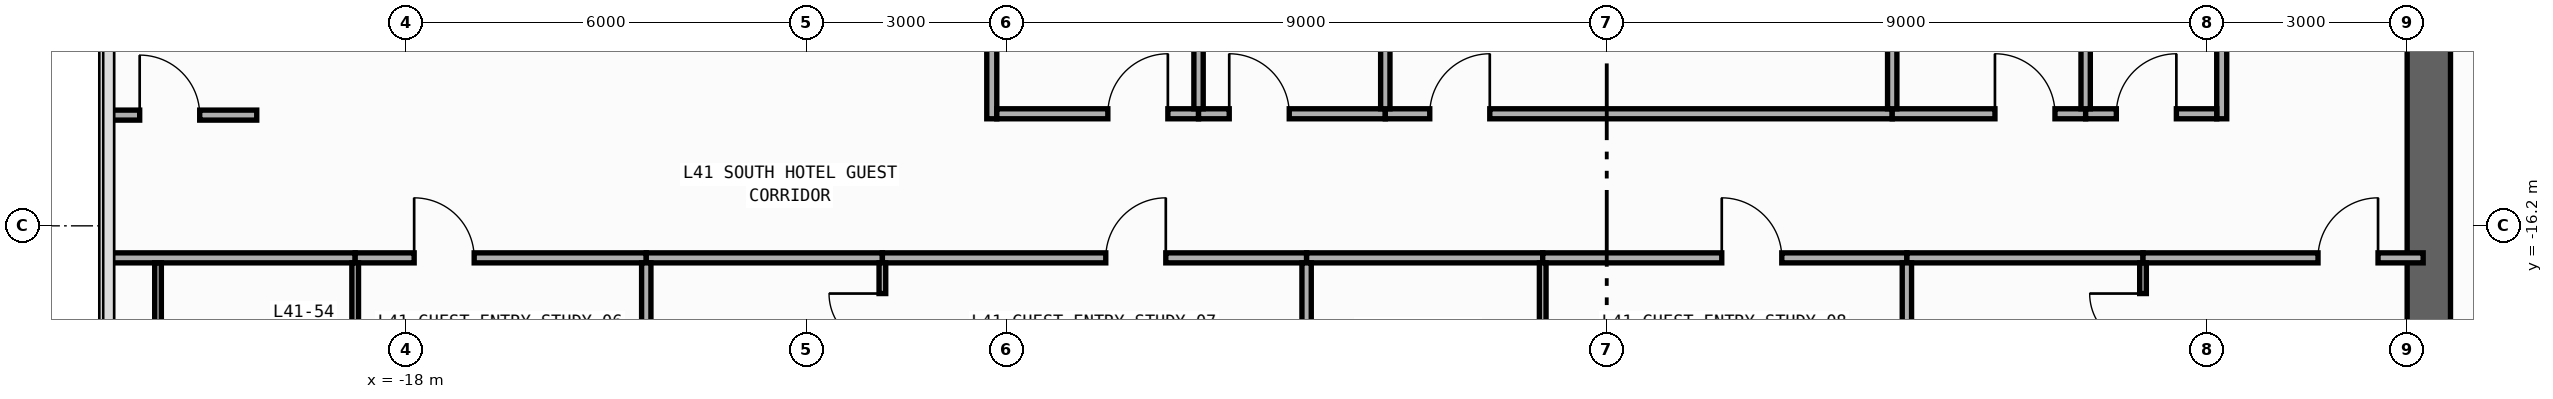
"""IFC4 building model, lengths in metres.
Left out: names, types, materials, properties, quantities, classifications, styles, units other than length and angle.
Written with IfcOpenShell. Run it as: python <this file> out.ifc"""

import sys

from ifc_helpers import new_model, si_unit, direction, frame, frame_2d, origin, place, context, subcontext, project, spatial, rectangle, extrude, element, fill, save


model = new_model("IFC4")
c1 = context("Model", 3, precision=1e-05, world=origin(), true_north=direction((0.0, 1.0)))
c2 = subcontext(c1, "Body", "Model", "MODEL_VIEW")
j1 = project(units=[si_unit("LENGTHUNIT", "METRE"), si_unit("PLANEANGLEUNIT", "RADIAN")], contexts=[c1])
p1 = place(None, origin())
s1 = spatial("IfcSite", under=j1, at=p1, CompositionType="ELEMENT")
p2 = place(p1, origin())
s2 = spatial("IfcBuilding", under=s1, at=p2, CompositionType="ELEMENT")
p3 = place(p2, frame((0.0, 0.0, 180.2)))
s3 = spatial("IfcBuildingStorey", under=s2, at=p3, CompositionType="ELEMENT", Elevation=180.2)
p4 = place(p3, frame((12.325, -19.8, 0.0), z_axis=(0.0, 0.0, 1.0), x_axis=(0.0, 1.0, 0.0)))
e1 = element("IfcWall", 1, at=p4, inside=s3, PredefinedType="SHEAR", context=c2, shape_type="SweptSolid", body=[
    extrude(rectangle(XDim=27.0, YDim=0.65, at=frame_2d((13.5, 0.0))), origin(), (0.0, 0.0, 1.0), 3.54),
])
p5 = place(p4, frame((23.05, 0.0, 0.0)))
e2 = element("IfcOpeningElement", 2, at=p5, cuts=e1, PredefinedType="OPENING", context=c2, shape_type="SweptSolid", body=[
    extrude(rectangle(XDim=1.1, YDim=2.2, at=frame_2d((0.55, 1.1))), frame((0.0, 0.335, 0.0), z_axis=(0.0, -1.0, 0.0), x_axis=(1.0, 0.0, 0.0)), (0.0, 0.0, 1.0), 0.67),
])
p6 = place(p4, frame((19.85, 0.0, 0.0)))
e3 = element("IfcOpeningElement", 3, at=p6, cuts=e1, PredefinedType="OPENING", context=c2, shape_type="SweptSolid", body=[
    extrude(rectangle(XDim=1.1, YDim=2.2, at=frame_2d((0.55, 1.1))), frame((0.0, 0.335, 0.0), z_axis=(0.0, -1.0, 0.0), x_axis=(1.0, 0.0, 0.0)), (0.0, 0.0, 1.0), 0.67),
])
p7 = place(p4, frame((16.65, 0.0, 0.0)))
e4 = element("IfcOpeningElement", 4, at=p7, cuts=e1, PredefinedType="OPENING", context=c2, shape_type="SweptSolid", body=[
    extrude(rectangle(XDim=1.1, YDim=2.2, at=frame_2d((0.55, 1.1))), frame((0.0, 0.335, 0.0), z_axis=(0.0, -1.0, 0.0), x_axis=(1.0, 0.0, 0.0)), (0.0, 0.0, 1.0), 0.67),
])
p8 = place(p4, frame((10.175, 0.0, 0.0)))
e5 = element("IfcOpeningElement", 5, at=p8, cuts=e1, PredefinedType="OPENING", context=c2, shape_type="SweptSolid", body=[
    extrude(rectangle(XDim=0.85, YDim=2.1, at=frame_2d((0.425, 1.05))), frame((0.0, 0.335, 0.0), z_axis=(0.0, -1.0, 0.0), x_axis=(1.0, 0.0, 0.0)), (0.0, 0.0, 1.0), 0.67),
])
p9 = place(p4, frame((12.725, 0.0, 0.0)))
e6 = element("IfcOpeningElement", 6, at=p9, cuts=e1, PredefinedType="OPENING", context=c2, shape_type="SweptSolid", body=[
    extrude(rectangle(XDim=1.15, YDim=2.2, at=frame_2d((0.575, 1.1))), frame((0.0, 0.335, 0.0), z_axis=(0.0, -1.0, 0.0), x_axis=(1.0, 0.0, 0.0)), (0.0, 0.0, 1.0), 0.67),
])
p10 = place(p4, frame((25.125, 0.0, 0.0)))
e7 = element("IfcOpeningElement", 7, at=p10, cuts=e1, PredefinedType="OPENING", context=c2, shape_type="SweptSolid", body=[
    extrude(rectangle(XDim=0.85, YDim=2.1, at=frame_2d((0.425, 1.05))), frame((0.0, 0.335, 0.0), z_axis=(0.0, -1.0, 0.0), x_axis=(1.0, 0.0, 0.0)), (0.0, 0.0, 1.0), 0.67),
])
p11 = place(p3, frame((-9.22, -14.595, 0.0), z_axis=(0.0, 0.0, 1.0), x_axis=(0.0, 1.0, 0.0)))
e8 = element("IfcWall", 8, at=p11, inside=s3, PredefinedType="PARTITIONING", context=c2, shape_type="SweptSolid", body=[
    extrude(rectangle(XDim=15.095, YDim=0.15, at=frame_2d((7.547, 0.0))), origin(), (0.0, 0.0, 1.0), 2.952),
])
p12 = place(p11, frame((8.707, 0.0, 0.0)))
e9 = element("IfcOpeningElement", 9, at=p12, cuts=e8, PredefinedType="OPENING", context=c2, shape_type="SweptSolid", body=[
    extrude(rectangle(XDim=0.9, YDim=2.15, at=frame_2d((0.45, 1.075))), frame((0.0, 0.085, 0.0), z_axis=(0.0, -1.0, 0.0), x_axis=(1.0, 0.0, 0.0)), (0.0, 0.0, 1.0), 0.17),
])
p13 = place(p3, frame((9.22, -14.595, 0.0), z_axis=(0.0, 0.0, 1.0), x_axis=(0.0, 1.0, 0.0)))
e10 = element("IfcWall", 10, at=p13, inside=s3, PredefinedType="PARTITIONING", context=c2, shape_type="SweptSolid", body=[
    extrude(rectangle(XDim=15.095, YDim=0.15, at=frame_2d((7.547, 0.0))), origin(), (0.0, 0.0, 1.0), 2.952),
])
p14 = place(p13, frame((8.707, 0.0, 0.0)))
e11 = element("IfcOpeningElement", 11, at=p14, cuts=e10, PredefinedType="OPENING", context=c2, shape_type="SweptSolid", body=[
    extrude(rectangle(XDim=0.9, YDim=2.15, at=frame_2d((0.45, 1.075))), frame((0.0, 0.085, 0.0), z_axis=(0.0, -1.0, 0.0), x_axis=(1.0, 0.0, 0.0)), (0.0, 0.0, 1.0), 0.17),
])
p15 = place(p3, frame((-9.145, -14.52, 0.0), z_axis=(0.0, 0.0, 1.0), x_axis=(1.0, 0.0, 0.0)))
e12 = element("IfcWall", 12, at=p15, inside=s3, PredefinedType="PARTITIONING", context=c2, shape_type="SweptSolid", body=[
    extrude(rectangle(XDim=3.025, YDim=0.15, at=frame_2d((1.512, 0.0))), origin(), (0.0, 0.0, 1.0), 3.54),
])
p16 = place(p15, frame((1.665, 0.0, 0.0)))
e13 = element("IfcOpeningElement", 13, at=p16, cuts=e12, PredefinedType="OPENING", context=c2, shape_type="SweptSolid", body=[
    extrude(rectangle(XDim=0.9, YDim=2.15, at=frame_2d((0.45, 1.075))), frame((0.0, 0.085, 0.0), z_axis=(0.0, -1.0, 0.0), x_axis=(1.0, 0.0, 0.0)), (0.0, 0.0, 1.0), 0.17),
])
p17 = place(p3, frame((-6.12, -14.52, 0.0), z_axis=(0.0, 0.0, 1.0), x_axis=(1.0, 0.0, 0.0)))
e14 = element("IfcWall", 14, at=p17, inside=s3, PredefinedType="PARTITIONING", context=c2, shape_type="SweptSolid", body=[
    extrude(rectangle(XDim=2.8, YDim=0.15, at=frame_2d((1.4, 0.0))), origin(), (0.0, 0.0, 1.0), 3.54),
])
p18 = place(p17, frame((0.46, 0.0, 0.0)))
e15 = element("IfcOpeningElement", 15, at=p18, cuts=e14, PredefinedType="OPENING", context=c2, shape_type="SweptSolid", body=[
    extrude(rectangle(XDim=0.9, YDim=2.15, at=frame_2d((0.45, 1.075))), frame((0.0, 0.085, 0.0), z_axis=(0.0, -1.0, 0.0), x_axis=(1.0, 0.0, 0.0)), (0.0, 0.0, 1.0), 0.17),
])
p19 = place(p3, frame((-3.32, -14.52, 0.0), z_axis=(0.0, 0.0, 1.0), x_axis=(1.0, 0.0, 0.0)))
e16 = element("IfcWall", 16, at=p19, inside=s3, PredefinedType="PARTITIONING", context=c2, shape_type="SweptSolid", body=[
    extrude(rectangle(XDim=7.6, YDim=0.15, at=frame_2d((3.8, 0.0))), origin(), (0.0, 0.0, 1.0), 3.54),
])
p20 = place(p19, frame((0.667, 0.0, 0.0)))
e17 = element("IfcOpeningElement", 17, at=p20, cuts=e16, PredefinedType="OPENING", context=c2, shape_type="SweptSolid", body=[
    extrude(rectangle(XDim=0.9, YDim=2.15, at=frame_2d((0.45, 1.075))), frame((0.0, 0.085, 0.0), z_axis=(0.0, -1.0, 0.0), x_axis=(1.0, 0.0, 0.0)), (0.0, 0.0, 1.0), 0.17),
])
p21 = place(p3, frame((4.28, -14.52, 0.0), z_axis=(0.0, 0.0, 1.0), x_axis=(1.0, 0.0, 0.0)))
e18 = element("IfcWall", 18, at=p21, inside=s3, PredefinedType="PARTITIONING", context=c2, shape_type="SweptSolid", body=[
    extrude(rectangle(XDim=2.9, YDim=0.15, at=frame_2d((1.45, 0.0))), origin(), (0.0, 0.0, 1.0), 3.54),
])
p22 = place(p21, frame((1.54, 0.0, 0.0)))
e19 = element("IfcOpeningElement", 19, at=p22, cuts=e18, PredefinedType="OPENING", context=c2, shape_type="SweptSolid", body=[
    extrude(rectangle(XDim=0.9, YDim=2.15, at=frame_2d((0.45, 1.075))), frame((0.0, 0.085, 0.0), z_axis=(0.0, -1.0, 0.0), x_axis=(1.0, 0.0, 0.0)), (0.0, 0.0, 1.0), 0.17),
])
p23 = place(p3, frame((7.18, -14.52, 0.0), z_axis=(0.0, 0.0, 1.0), x_axis=(1.0, 0.0, 0.0)))
e20 = element("IfcWall", 20, at=p23, inside=s3, PredefinedType="PARTITIONING", context=c2, shape_type="SweptSolid", body=[
    extrude(rectangle(XDim=1.965, YDim=0.15, at=frame_2d((0.982, 0.0))), origin(), (0.0, 0.0, 1.0), 3.54),
])
p24 = place(p23, frame((0.46, 0.0, 0.0)))
e21 = element("IfcOpeningElement", 21, at=p24, cuts=e20, PredefinedType="OPENING", context=c2, shape_type="SweptSolid", body=[
    extrude(rectangle(XDim=0.9, YDim=2.15, at=frame_2d((0.45, 1.075))), frame((0.0, 0.085, 0.0), z_axis=(0.0, -1.0, 0.0), x_axis=(1.0, 0.0, 0.0)), (0.0, 0.0, 1.0), 0.17),
])
p25 = place(p3, frame((-22.455, -16.68, 0.0), z_axis=(0.0, 0.0, 1.0), x_axis=(1.0, 0.0, 0.0)))
e22 = element("IfcWall", 22, at=p25, inside=s3, PredefinedType="PARTITIONING", context=c2, shape_type="SweptSolid", body=[
    extrude(rectangle(XDim=3.691, YDim=0.15, at=frame_2d((1.846, 0.0))), origin(), (0.0, 0.0, 1.0), 3.54),
])
p26 = place(p3, frame((-18.764, -16.68, 0.0), z_axis=(0.0, 0.0, 1.0), x_axis=(1.0, 0.0, 0.0)))
e23 = element("IfcWall", 23, at=p26, inside=s3, PredefinedType="PARTITIONING", context=c2, shape_type="SweptSolid", body=[
    extrude(rectangle(XDim=4.364, YDim=0.15, at=frame_2d((2.182, 0.0))), origin(), (0.0, 0.0, 1.0), 3.54),
])
p27 = place(p26, frame((0.884, 0.0, 0.0)))
e24 = element("IfcOpeningElement", 24, at=p27, cuts=e23, PredefinedType="OPENING", context=c2, shape_type="SweptSolid", body=[
    extrude(rectangle(XDim=0.9, YDim=2.15, at=frame_2d((0.45, 1.075))), frame((0.0, 0.085, 0.0), z_axis=(0.0, -1.0, 0.0), x_axis=(1.0, 0.0, 0.0)), (0.0, 0.0, 1.0), 0.17),
])
p28 = place(p3, frame((-14.4, -16.68, 0.0), z_axis=(0.0, 0.0, 1.0), x_axis=(1.0, 0.0, 0.0)))
e25 = element("IfcWall", 25, at=p28, inside=s3, PredefinedType="PARTITIONING", context=c2, shape_type="SweptSolid", body=[
    extrude(rectangle(XDim=3.54, YDim=0.15, at=frame_2d((1.77, 0.0))), origin(), (0.0, 0.0, 1.0), 3.54),
])
p29 = place(p3, frame((-10.86, -16.68, 0.0), z_axis=(0.0, 0.0, 1.0), x_axis=(1.0, 0.0, 0.0)))
e26 = element("IfcWall", 26, at=p29, inside=s3, PredefinedType="PARTITIONING", context=c2, shape_type="SweptSolid", body=[
    extrude(rectangle(XDim=6.36, YDim=0.15, at=frame_2d((3.18, 0.0))), origin(), (0.0, 0.0, 1.0), 3.54),
])
p30 = place(p29, frame((3.349, 0.0, 0.0)))
e27 = element("IfcOpeningElement", 27, at=p30, cuts=e26, PredefinedType="OPENING", context=c2, shape_type="SweptSolid", body=[
    extrude(rectangle(XDim=0.9, YDim=2.15, at=frame_2d((0.45, 1.075))), frame((0.0, 0.085, 0.0), z_axis=(0.0, -1.0, 0.0), x_axis=(1.0, 0.0, 0.0)), (0.0, 0.0, 1.0), 0.17),
])
p31 = place(p3, frame((-4.5, -16.68, 0.0), z_axis=(0.0, 0.0, 1.0), x_axis=(1.0, 0.0, 0.0)))
e28 = element("IfcWall", 28, at=p31, inside=s3, PredefinedType="PARTITIONING", context=c2, shape_type="SweptSolid", body=[
    extrude(rectangle(XDim=3.54, YDim=0.15, at=frame_2d((1.77, 0.0))), origin(), (0.0, 0.0, 1.0), 3.54),
])
p32 = place(p3, frame((-0.96, -16.68, 0.0), z_axis=(0.0, 0.0, 1.0), x_axis=(1.0, 0.0, 0.0)))
e29 = element("IfcWall", 29, at=p32, inside=s3, PredefinedType="PARTITIONING", context=c2, shape_type="SweptSolid", body=[
    extrude(rectangle(XDim=5.46, YDim=0.15, at=frame_2d((2.73, 0.0))), origin(), (0.0, 0.0, 1.0), 3.54),
])
p33 = place(p32, frame((2.684, 0.0, 0.0)))
e30 = element("IfcOpeningElement", 30, at=p33, cuts=e29, PredefinedType="OPENING", context=c2, shape_type="SweptSolid", body=[
    extrude(rectangle(XDim=0.9, YDim=2.15, at=frame_2d((0.45, 1.075))), frame((0.0, 0.085, 0.0), z_axis=(0.0, -1.0, 0.0), x_axis=(1.0, 0.0, 0.0)), (0.0, 0.0, 1.0), 0.17),
])
p34 = place(p3, frame((4.5, -16.68, 0.0), z_axis=(0.0, 0.0, 1.0), x_axis=(1.0, 0.0, 0.0)))
e31 = element("IfcWall", 31, at=p34, inside=s3, PredefinedType="PARTITIONING", context=c2, shape_type="SweptSolid", body=[
    extrude(rectangle(XDim=3.54, YDim=0.15, at=frame_2d((1.77, 0.0))), origin(), (0.0, 0.0, 1.0), 3.54),
])
p35 = place(p3, frame((8.04, -16.68, 0.0), z_axis=(0.0, 0.0, 1.0), x_axis=(1.0, 0.0, 0.0)))
e32 = element("IfcWall", 32, at=p35, inside=s3, PredefinedType="PARTITIONING", context=c2, shape_type="SweptSolid", body=[
    extrude(rectangle(XDim=4.2, YDim=0.15, at=frame_2d((2.1, 0.0))), origin(), (0.0, 0.0, 1.0), 3.54),
])
p36 = place(p35, frame((2.624, 0.0, 0.0)))
e33 = element("IfcOpeningElement", 33, at=p36, cuts=e32, PredefinedType="OPENING", context=c2, shape_type="SweptSolid", body=[
    extrude(rectangle(XDim=0.9, YDim=2.15, at=frame_2d((0.45, 1.075))), frame((0.0, 0.085, 0.0), z_axis=(0.0, -1.0, 0.0), x_axis=(1.0, 0.0, 0.0)), (0.0, 0.0, 1.0), 0.17),
])
p37 = place(p3, frame((-22.455, -14.54, 0.0), z_axis=(0.0, 0.0, 1.0), x_axis=(1.0, 0.0, 0.0)))
e34 = element("IfcWall", 34, at=p37, inside=s3, PredefinedType="PARTITIONING", context=c2, shape_type="SweptSolid", body=[
    extrude(rectangle(XDim=2.215, YDim=0.15, at=frame_2d((1.107, 0.0))), origin(), (0.0, 0.0, 1.0), 3.54),
])
p38 = place(p37, frame((0.46, 0.0, 0.0)))
e35 = element("IfcOpeningElement", 35, at=p38, cuts=e34, PredefinedType="OPENING", context=c2, shape_type="SweptSolid", body=[
    extrude(rectangle(XDim=0.9, YDim=2.15, at=frame_2d((0.45, 1.075))), frame((0.0, 0.085, 0.0), z_axis=(0.0, -1.0, 0.0), x_axis=(1.0, 0.0, 0.0)), (0.0, 0.0, 1.0), 0.17),
])
for number, where, z_axis, x_axis in (
    (36, (-6.12, -14.445, 0.0), (0.0, 0.0, 1.0), (0.0, 1.0, 0.0)),
    (37, (-3.32, -14.445, 0.0), (0.0, 0.0, 1.0), (0.0, 1.0, 0.0)),
):
    element("IfcWall", number, at=place(p3, frame(where, z_axis=z_axis, x_axis=x_axis)), inside=s3, PredefinedType="PARTITIONING", context=c2, shape_type="SweptSolid", body=[
        extrude(rectangle(XDim=14.875, YDim=0.14, at=frame_2d((7.438, 0.0))), origin(), (0.0, 0.0, 1.0), 3.54),
    ])
for number, where, z_axis, x_axis in (
    (38, (4.28, -14.445, 0.0), (0.0, 0.0, 1.0), (0.0, 1.0, 0.0)),
    (39, (7.18, -14.445, 0.0), (0.0, 0.0, 1.0), (0.0, 1.0, 0.0)),
):
    element("IfcWall", number, at=place(p3, frame(where, z_axis=z_axis, x_axis=x_axis)), inside=s3, PredefinedType="PARTITIONING", context=c2, shape_type="SweptSolid", body=[
        extrude(rectangle(XDim=2.885, YDim=0.14, at=frame_2d((1.442, 0.0))), origin(), (0.0, 0.0, 1.0), 3.54),
    ])
p39 = place(p3, frame((-18.764, -19.72, 0.0), z_axis=(0.0, 0.0, 1.0), x_axis=(0.0, 1.0, 0.0)))
e40 = element("IfcWall", 40, at=p39, inside=s3, PredefinedType="PARTITIONING", context=c2, shape_type="SweptSolid", body=[
    extrude(rectangle(XDim=2.965, YDim=0.1, at=frame_2d((1.482, 0.0))), origin(), (0.0, 0.0, 1.0), 3.54),
])
p40 = place(p3, frame((-14.4, -19.77, 0.0), z_axis=(0.0, 0.0, 1.0), x_axis=(0.0, 1.0, 0.0)))
e41 = element("IfcWall", 41, at=p40, inside=s3, PredefinedType="PARTITIONING", context=c2, shape_type="SweptSolid", body=[
    extrude(rectangle(XDim=3.015, YDim=0.14, at=frame_2d((1.508, 0.0))), origin(), (0.0, 0.0, 1.0), 2.952),
])
p41 = place(p3, frame((-10.86, -19.72, 0.0), z_axis=(0.0, 0.0, 1.0), x_axis=(0.0, 1.0, 0.0)))
e42 = element("IfcWall", 42, at=p41, inside=s3, PredefinedType="PARTITIONING", context=c2, shape_type="SweptSolid", body=[
    extrude(rectangle(XDim=2.965, YDim=0.1, at=frame_2d((1.482, 0.0))), origin(), (0.0, 0.0, 1.0), 3.54),
])
p42 = place(p41, frame((1.705, 0.0, 0.0)))
e43 = element("IfcOpeningElement", 43, at=p42, cuts=e42, PredefinedType="OPENING", context=c2, shape_type="SweptSolid", body=[
    extrude(rectangle(XDim=0.8, YDim=2.1, at=frame_2d((0.4, 1.05))), frame((0.0, 0.06, 0.0), z_axis=(0.0, -1.0, 0.0), x_axis=(1.0, 0.0, 0.0)), (0.0, 0.0, 1.0), 0.12),
])
p43 = place(p3, frame((-4.5, -19.77, 0.0), z_axis=(0.0, 0.0, 1.0), x_axis=(0.0, 1.0, 0.0)))
e44 = element("IfcWall", 44, at=p43, inside=s3, PredefinedType="PARTITIONING", context=c2, shape_type="SweptSolid", body=[
    extrude(rectangle(XDim=3.015, YDim=0.14, at=frame_2d((1.508, 0.0))), origin(), (0.0, 0.0, 1.0), 3.54),
])
p44 = place(p3, frame((-0.96, -19.72, 0.0), z_axis=(0.0, 0.0, 1.0), x_axis=(0.0, 1.0, 0.0)))
e45 = element("IfcWall", 45, at=p44, inside=s3, PredefinedType="PARTITIONING", context=c2, shape_type="SweptSolid", body=[
    extrude(rectangle(XDim=2.965, YDim=0.1, at=frame_2d((1.482, 0.0))), origin(), (0.0, 0.0, 1.0), 3.54),
])
p45 = place(p3, frame((4.5, -19.77, 0.0), z_axis=(0.0, 0.0, 1.0), x_axis=(0.0, 1.0, 0.0)))
e46 = element("IfcWall", 46, at=p45, inside=s3, PredefinedType="PARTITIONING", context=c2, shape_type="SweptSolid", body=[
    extrude(rectangle(XDim=3.015, YDim=0.14, at=frame_2d((1.508, 0.0))), origin(), (0.0, 0.0, 1.0), 3.54),
])
p46 = place(p3, frame((8.04, -19.72, 0.0), z_axis=(0.0, 0.0, 1.0), x_axis=(0.0, 1.0, 0.0)))
e47 = element("IfcWall", 47, at=p46, inside=s3, PredefinedType="PARTITIONING", context=c2, shape_type="SweptSolid", body=[
    extrude(rectangle(XDim=2.965, YDim=0.1, at=frame_2d((1.482, 0.0))), origin(), (0.0, 0.0, 1.0), 3.54),
])
p47 = place(p46, frame((1.705, 0.0, 0.0)))
e48 = element("IfcOpeningElement", 48, at=p47, cuts=e47, PredefinedType="OPENING", context=c2, shape_type="SweptSolid", body=[
    extrude(rectangle(XDim=0.8, YDim=2.1, at=frame_2d((0.4, 1.05))), frame((0.0, 0.06, 0.0), z_axis=(0.0, -1.0, 0.0), x_axis=(1.0, 0.0, 0.0)), (0.0, 0.0, 1.0), 0.12),
])
p48 = place(p3, frame((-21.72, -18.77, 0.0), z_axis=(0.0, 0.0, 1.0), x_axis=(0.0, 1.0, 0.0)))
e49 = element("IfcWall", 49, at=p48, inside=s3, PredefinedType="PARTITIONING", context=c2, shape_type="SweptSolid", body=[
    extrude(rectangle(XDim=2.015, YDim=0.1, at=frame_2d((1.008, 0.0))), origin(), (0.0, 0.0, 1.0), 3.54),
])
p49 = place(p16, origin())
e50 = element("IfcDoor", 50, at=p49, inside=s3, OperationType="SINGLE_SWING_RIGHT", PredefinedType="DOOR", context=c2, shape_type="SweptSolid", body=[
    extrude(rectangle(XDim=0.9, YDim=2.15, at=frame_2d((0.45, 1.075))), frame((0.0, 0.025, 0.0), z_axis=(0.0, -1.0, 0.0), x_axis=(1.0, 0.0, 0.0)), (0.0, 0.0, 1.0), 0.05),
])
fill(e13, e50)
p50 = place(p18, origin())
e51 = element("IfcDoor", 51, at=p50, inside=s3, OperationType="SINGLE_SWING_LEFT", PredefinedType="DOOR", context=c2, shape_type="SweptSolid", body=[
    extrude(rectangle(XDim=0.9, YDim=2.15, at=frame_2d((0.45, 1.075))), frame((0.0, 0.025, 0.0), z_axis=(0.0, -1.0, 0.0), x_axis=(1.0, 0.0, 0.0)), (0.0, 0.0, 1.0), 0.05),
])
fill(e15, e51)
p51 = place(p20, origin())
e52 = element("IfcDoor", 52, at=p51, inside=s3, OperationType="SINGLE_SWING_RIGHT", PredefinedType="DOOR", context=c2, shape_type="SweptSolid", body=[
    extrude(rectangle(XDim=0.9, YDim=2.15, at=frame_2d((0.45, 1.075))), frame((0.0, 0.025, 0.0), z_axis=(0.0, -1.0, 0.0), x_axis=(1.0, 0.0, 0.0)), (0.0, 0.0, 1.0), 0.05),
])
fill(e17, e52)
p52 = place(p22, origin())
e53 = element("IfcDoor", 53, at=p52, inside=s3, OperationType="SINGLE_SWING_LEFT", PredefinedType="DOOR", context=c2, shape_type="SweptSolid", body=[
    extrude(rectangle(XDim=0.9, YDim=2.15, at=frame_2d((0.45, 1.075))), frame((0.0, 0.025, 0.0), z_axis=(0.0, -1.0, 0.0), x_axis=(1.0, 0.0, 0.0)), (0.0, 0.0, 1.0), 0.05),
])
fill(e19, e53)
p53 = place(p24, origin())
e54 = element("IfcDoor", 54, at=p53, inside=s3, OperationType="SINGLE_SWING_RIGHT", PredefinedType="DOOR", context=c2, shape_type="SweptSolid", body=[
    extrude(rectangle(XDim=0.9, YDim=2.15, at=frame_2d((0.45, 1.075))), frame((0.0, 0.025, 0.0), z_axis=(0.0, -1.0, 0.0), x_axis=(1.0, 0.0, 0.0)), (0.0, 0.0, 1.0), 0.05),
])
fill(e21, e54)
p54 = place(p27, origin())
e55 = element("IfcDoor", 55, at=p54, inside=s3, OperationType="SINGLE_SWING_LEFT", PredefinedType="DOOR", context=c2, shape_type="SweptSolid", body=[
    extrude(rectangle(XDim=0.9, YDim=2.15, at=frame_2d((0.45, 1.075))), frame((0.0, 0.025, 0.0), z_axis=(0.0, -1.0, 0.0), x_axis=(1.0, 0.0, 0.0)), (0.0, 0.0, 1.0), 0.05),
])
fill(e24, e55)
p55 = place(p30, origin())
e56 = element("IfcDoor", 56, at=p55, inside=s3, OperationType="SINGLE_SWING_RIGHT", PredefinedType="DOOR", context=c2, shape_type="SweptSolid", body=[
    extrude(rectangle(XDim=0.9, YDim=2.15, at=frame_2d((0.45, 1.075))), frame((0.0, 0.025, 0.0), z_axis=(0.0, -1.0, 0.0), x_axis=(1.0, 0.0, 0.0)), (0.0, 0.0, 1.0), 0.05),
])
fill(e27, e56)
p56 = place(p33, origin())
e57 = element("IfcDoor", 57, at=p56, inside=s3, OperationType="SINGLE_SWING_LEFT", PredefinedType="DOOR", context=c2, shape_type="SweptSolid", body=[
    extrude(rectangle(XDim=0.9, YDim=2.15, at=frame_2d((0.45, 1.075))), frame((0.0, 0.025, 0.0), z_axis=(0.0, -1.0, 0.0), x_axis=(1.0, 0.0, 0.0)), (0.0, 0.0, 1.0), 0.05),
])
fill(e30, e57)
p57 = place(p36, origin())
e58 = element("IfcDoor", 58, at=p57, inside=s3, OperationType="SINGLE_SWING_RIGHT", PredefinedType="DOOR", context=c2, shape_type="SweptSolid", body=[
    extrude(rectangle(XDim=0.9, YDim=2.15, at=frame_2d((0.45, 1.075))), frame((0.0, 0.025, 0.0), z_axis=(0.0, -1.0, 0.0), x_axis=(1.0, 0.0, 0.0)), (0.0, 0.0, 1.0), 0.05),
])
fill(e33, e58)
p58 = place(p38, origin())
e59 = element("IfcDoor", 59, at=p58, inside=s3, OperationType="SINGLE_SWING_LEFT", PredefinedType="DOOR", context=c2, shape_type="SweptSolid", body=[
    extrude(rectangle(XDim=0.9, YDim=2.15, at=frame_2d((0.45, 1.075))), frame((0.0, 0.025, 0.0), z_axis=(0.0, -1.0, 0.0), x_axis=(1.0, 0.0, 0.0)), (0.0, 0.0, 1.0), 0.05),
])
fill(e35, e59)
p59 = place(p42, origin())
e60 = element("IfcDoor", 60, at=p59, inside=s3, OperationType="SINGLE_SWING_RIGHT", PredefinedType="DOOR", context=c2, shape_type="SweptSolid", body=[
    extrude(rectangle(XDim=0.8, YDim=2.1, at=frame_2d((0.4, 1.05))), frame((0.0, 0.025, 0.0), z_axis=(0.0, -1.0, 0.0), x_axis=(1.0, 0.0, 0.0)), (0.0, 0.0, 1.0), 0.05),
])
fill(e43, e60)
p60 = place(p47, origin())
e61 = element("IfcDoor", 61, at=p60, inside=s3, OperationType="SINGLE_SWING_RIGHT", PredefinedType="DOOR", context=c2, shape_type="SweptSolid", body=[
    extrude(rectangle(XDim=0.8, YDim=2.1, at=frame_2d((0.4, 1.05))), frame((0.0, 0.025, 0.0), z_axis=(0.0, -1.0, 0.0), x_axis=(1.0, 0.0, 0.0)), (0.0, 0.0, 1.0), 0.05),
])
fill(e48, e61)
save(model, sys.argv[1])
